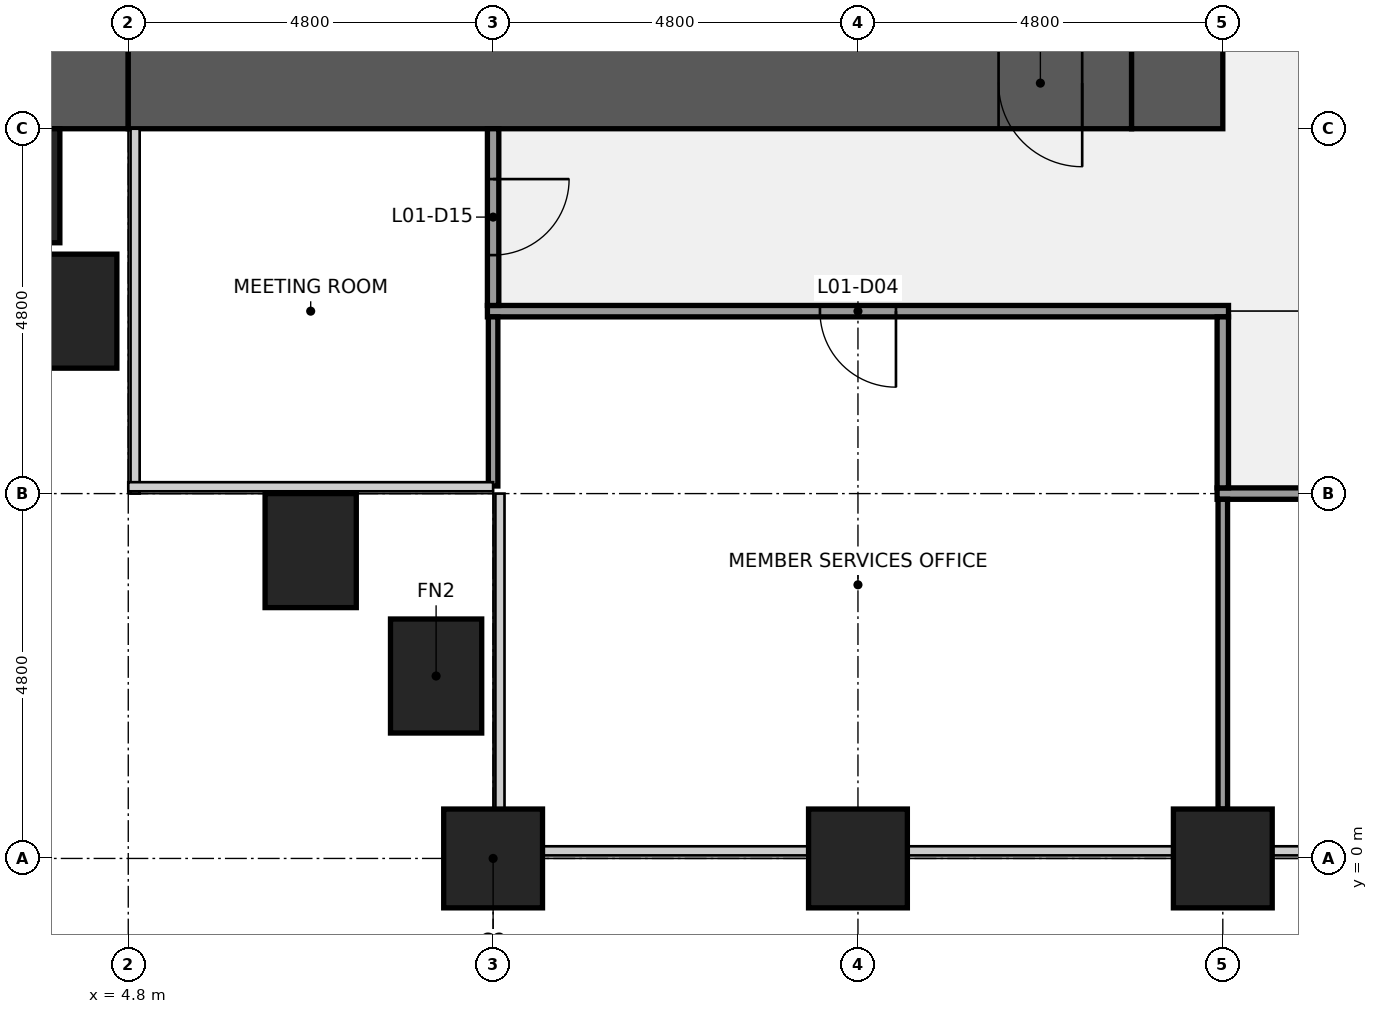
"""IFC4 building model, lengths in metres.
Left out: names, types, materials, properties, quantities, classifications, styles, units other than length and angle.
Written with IfcOpenShell. Run it as: python <this file> out.ifc"""

import sys

from ifc_helpers import new_model, si_unit, direction, frame, frame_2d, origin, origin_2d, place, context, subcontext, project, spatial, rectangle, extrude, element, fill, save


model = new_model("IFC4")
c1 = context("Model", 3, precision=1e-05, world=origin(), true_north=direction((0.0, 1.0)))
c2 = subcontext(c1, "Body", "Model", "MODEL_VIEW")
j1 = project(units=[si_unit("LENGTHUNIT", "METRE"), si_unit("PLANEANGLEUNIT", "RADIAN")], contexts=[c1])
p1 = place(None, origin())
s1 = spatial("IfcSite", under=j1, at=p1, CompositionType="ELEMENT")
p2 = place(p1, origin())
s2 = spatial("IfcBuilding", under=s1, at=p2, CompositionType="ELEMENT")
p3 = place(p2, frame((0.0, 0.0, 12.6)))
s3 = spatial("IfcBuildingStorey", under=s2, at=p3, CompositionType="ELEMENT", Elevation=12.6)
for number, where, z_axis, x_axis in (
    (1, (9.6, 0.0, 0.0), (0.0, 0.0, 1.0), (1.0, 0.0, 0.0)),
    (2, (14.4, 0.0, 0.0), (0.0, 0.0, 1.0), (1.0, 0.0, 0.0)),
    (3, (19.2, 0.0, 0.0), (0.0, 0.0, 1.0), (1.0, 0.0, 0.0)),
):
    element("IfcColumn", number, at=place(p3, frame(where, z_axis=z_axis, x_axis=x_axis)), inside=s3, PredefinedType="COLUMN", context=c2, shape_type="SweptSolid", body=[
        extrude(rectangle(XDim=1.3, YDim=1.3, at=origin_2d()), origin(), (0.0, 0.0, 1.0), 4.4),
    ])
p4 = place(p3, frame((4.8, 10.2, 0.0), z_axis=(0.0, 0.0, 1.0), x_axis=(-1.0, 0.0, 0.0)))
e4 = element("IfcWall", 4, at=p4, inside=s3, PredefinedType="SHEAR", context=c2, shape_type="SweptSolid", body=[
    extrude(rectangle(XDim=3.6, YDim=1.2, at=frame_2d((1.8, 0.0))), origin(), (0.0, 0.0, 1.0), 4.24),
])
p5 = place(p3, frame((18.0, 10.2, 0.0), z_axis=(0.0, 0.0, 1.0), x_axis=(-1.0, 0.0, 0.0)))
e5 = element("IfcWall", 5, at=p5, inside=s3, PredefinedType="SHEAR", context=c2, shape_type="SweptSolid", body=[
    extrude(rectangle(XDim=13.2, YDim=1.2, at=frame_2d((6.6, 0.0))), origin(), (0.0, 0.0, 1.0), 4.24),
])
p6 = place(p5, frame((0.65, 0.0, 0.0)))
e6 = element("IfcOpeningElement", 6, at=p6, cuts=e5, PredefinedType="OPENING", context=c2, shape_type="SweptSolid", body=[
    extrude(rectangle(XDim=1.1, YDim=2.1, at=frame_2d((0.55, 1.05))), frame((0.0, 0.61, 0.0), z_axis=(0.0, -1.0, 0.0), x_axis=(1.0, 0.0, 0.0)), (0.0, 0.0, 1.0), 1.22),
])
p7 = place(p3, frame((18.6, 38.4, 0.0), z_axis=(0.0, 0.0, 1.0), x_axis=(0.0, -1.0, 0.0)))
e7 = element("IfcWall", 7, at=p7, inside=s3, PredefinedType="SHEAR", context=c2, shape_type="SweptSolid", body=[
    extrude(rectangle(XDim=28.8, YDim=1.2, at=frame_2d((14.4, 0.0))), origin(), (0.0, 0.0, 1.0), 4.24),
])
p8 = place(p7, frame((18.3, 0.0, 0.0)))
e8 = element("IfcOpeningElement", 8, at=p8, cuts=e7, PredefinedType="OPENING", context=c2, shape_type="SweptSolid", body=[
    extrude(rectangle(XDim=1.8, YDim=2.1, at=frame_2d((0.9, 1.05))), frame((0.0, 0.61, 0.0), z_axis=(0.0, -1.0, 0.0), x_axis=(1.0, 0.0, 0.0)), (0.0, 0.0, 1.0), 1.22),
])
p9 = place(p7, frame((8.7, 0.0, 0.0)))
e9 = element("IfcOpeningElement", 9, at=p9, cuts=e7, PredefinedType="OPENING", context=c2, shape_type="SweptSolid", body=[
    extrude(rectangle(XDim=1.8, YDim=2.1, at=frame_2d((0.9, 1.05))), frame((0.0, 0.61, 0.0), z_axis=(0.0, -1.0, 0.0), x_axis=(1.0, 0.0, 0.0)), (0.0, 0.0, 1.0), 1.22),
])
p10 = place(p3, frame((19.125, 4.8, 0.0), z_axis=(0.0, 0.0, 1.0), x_axis=(1.0, 0.0, 0.0)))
e10 = element("IfcWall", 10, at=p10, inside=s3, PredefinedType="PARTITIONING", context=c2, shape_type="SweptSolid", body=[
    extrude(rectangle(XDim=19.35, YDim=0.15, at=frame_2d((9.675, 0.0))), origin(), (0.0, 0.0, 1.0), 3.27),
])
p11 = place(p10, frame((4.375, 0.0, 0.0)))
e11 = element("IfcOpeningElement", 11, at=p11, cuts=e10, PredefinedType="OPENING", context=c2, shape_type="SweptSolid", body=[
    extrude(rectangle(XDim=1.0, YDim=2.1, at=frame_2d((0.5, 1.05))), frame((0.0, 0.085, 0.0), z_axis=(0.0, -1.0, 0.0), x_axis=(1.0, 0.0, 0.0)), (0.0, 0.0, 1.0), 0.17),
])
p12 = place(p10, frame((11.575, 0.0, 0.0)))
e12 = element("IfcOpeningElement", 12, at=p12, cuts=e10, PredefinedType="OPENING", context=c2, shape_type="SweptSolid", body=[
    extrude(rectangle(XDim=1.0, YDim=2.1, at=frame_2d((0.5, 1.05))), frame((0.0, 0.085, 0.0), z_axis=(0.0, -1.0, 0.0), x_axis=(1.0, 0.0, 0.0)), (0.0, 0.0, 1.0), 0.17),
])
p13 = place(p10, frame((16.375, 0.0, 0.0)))
e13 = element("IfcOpeningElement", 13, at=p13, cuts=e10, PredefinedType="OPENING", context=c2, shape_type="SweptSolid", body=[
    extrude(rectangle(XDim=1.0, YDim=2.1, at=frame_2d((0.5, 1.05))), frame((0.0, 0.085, 0.0), z_axis=(0.0, -1.0, 0.0), x_axis=(1.0, 0.0, 0.0)), (0.0, 0.0, 1.0), 0.17),
])
p14 = place(p3, frame((9.525, 7.2, 0.0), z_axis=(0.0, 0.0, 1.0), x_axis=(1.0, 0.0, 0.0)))
e14 = element("IfcWall", 14, at=p14, inside=s3, PredefinedType="PARTITIONING", context=c2, shape_type="SweptSolid", body=[
    extrude(rectangle(XDim=9.75, YDim=0.15, at=frame_2d((4.875, 0.0))), origin(), (0.0, 0.0, 1.0), 3.27),
])
p15 = place(p14, frame((4.375, 0.0, 0.0)))
e15 = element("IfcOpeningElement", 15, at=p15, cuts=e14, PredefinedType="OPENING", context=c2, shape_type="SweptSolid", body=[
    extrude(rectangle(XDim=1.0, YDim=2.1, at=frame_2d((0.5, 1.05))), frame((0.0, 0.085, 0.0), z_axis=(0.0, -1.0, 0.0), x_axis=(1.0, 0.0, 0.0)), (0.0, 0.0, 1.0), 0.17),
])
p16 = place(p3, frame((9.6, 4.9, 0.0), z_axis=(0.0, 0.0, 1.0), x_axis=(0.0, 1.0, 0.0)))
e16 = element("IfcWall", 16, at=p16, inside=s3, PredefinedType="PARTITIONING", context=c2, shape_type="SweptSolid", body=[
    extrude(rectangle(XDim=2.225, YDim=0.125, at=frame_2d((1.113, 0.0))), origin(), (0.0, 0.0, 1.0), 3.27),
])
p17 = place(p3, frame((9.6, 7.275, 0.0), z_axis=(0.0, 0.0, 1.0), x_axis=(0.0, 1.0, 0.0)))
e17 = element("IfcWall", 17, at=p17, inside=s3, PredefinedType="PARTITIONING", context=c2, shape_type="SweptSolid", body=[
    extrude(rectangle(XDim=2.325, YDim=0.15, at=frame_2d((1.163, 0.0))), origin(), (0.0, 0.0, 1.0), 3.27),
])
p18 = place(p17, frame((0.663, 0.0, 0.0)))
e18 = element("IfcOpeningElement", 18, at=p18, cuts=e17, PredefinedType="OPENING", context=c2, shape_type="SweptSolid", body=[
    extrude(rectangle(XDim=1.0, YDim=2.1, at=frame_2d((0.5, 1.05))), frame((0.0, 0.085, 0.0), z_axis=(0.0, -1.0, 0.0), x_axis=(1.0, 0.0, 0.0)), (0.0, 0.0, 1.0), 0.17),
])
p19 = place(p3, frame((19.2, 0.65, 0.0), z_axis=(0.0, 0.0, 1.0), x_axis=(0.0, 1.0, 0.0)))
e19 = element("IfcWall", 19, at=p19, inside=s3, PredefinedType="PARTITIONING", context=c2, shape_type="SweptSolid", body=[
    extrude(rectangle(XDim=4.075, YDim=0.125, at=frame_2d((2.038, 0.0))), origin(), (0.0, 0.0, 1.0), 3.27),
])
p20 = place(p3, frame((19.2, 4.875, 0.0), z_axis=(0.0, 0.0, 1.0), x_axis=(0.0, 1.0, 0.0)))
e20 = element("IfcWall", 20, at=p20, inside=s3, PredefinedType="PARTITIONING", context=c2, shape_type="SweptSolid", body=[
    extrude(rectangle(XDim=2.25, YDim=0.15, at=frame_2d((1.125, 0.0))), origin(), (0.0, 0.0, 1.0), 3.27),
])
for number, where, z_axis, x_axis in (
    (21, (4.05, 7.2, 0.0), (0.0, 0.0, 1.0), (0.0, 1.0, 0.0)),
    (22, (7.2, 4.05, 0.0), (0.0, 0.0, 1.0), (1.0, 0.0, 0.0)),
    (23, (8.85, 2.4, 0.0), (0.0, 0.0, 1.0), (0.0, 1.0, 0.0)),
):
    element("IfcColumn", number, at=place(p3, frame(where, z_axis=z_axis, x_axis=x_axis)), inside=s3, PredefinedType="PILASTER", context=c2, shape_type="SweptSolid", body=[
        extrude(rectangle(XDim=1.2, YDim=1.5, at=origin_2d()), origin(), (0.0, 0.0, 1.0), 4.4),
    ])
p21 = place(p3, frame((2.4, 8.85, 0.0), z_axis=(0.0, 0.0, 1.0), x_axis=(1.0, 0.0, 0.0)))
e24 = element("IfcColumn", 24, at=p21, inside=s3, PredefinedType="PILASTER", context=c2, shape_type="SweptSolid", body=[
    extrude(rectangle(XDim=3.0, YDim=1.5, at=origin_2d()), origin(), (0.0, 0.0, 1.0), 4.4),
])
for number, where, z_axis, x_axis in (
    (25, (9.6, -1.075, 0.0), (0.0, 0.0, 1.0), (1.0, 0.0, 0.0)),
    (26, (14.4, -1.075, 0.0), (0.0, 0.0, 1.0), (1.0, 0.0, 0.0)),
    (27, (19.2, -1.075, 0.0), (0.0, 0.0, 1.0), (1.0, 0.0, 0.0)),
):
    element("IfcColumn", number, at=place(p3, frame(where, z_axis=z_axis, x_axis=x_axis)), inside=s3, PredefinedType="PILASTER", context=c2, shape_type="SweptSolid", body=[
        extrude(rectangle(XDim=4.2, YDim=0.85, at=origin_2d()), origin(), (0.0, 0.0, 1.0), 4.4),
    ])
p22 = place(p6, origin())
e28 = element("IfcDoor", 28, at=p22, inside=s3, OperationType="SINGLE_SWING_LEFT", PredefinedType="DOOR", context=c2, shape_type="SweptSolid", body=[
    extrude(rectangle(XDim=1.1, YDim=2.1, at=frame_2d((0.55, 1.05))), frame((0.0, 0.025, 0.0), z_axis=(0.0, -1.0, 0.0), x_axis=(1.0, 0.0, 0.0)), (0.0, 0.0, 1.0), 0.05),
])
fill(e6, e28)
p23 = place(p15, origin())
e29 = element("IfcDoor", 29, at=p23, inside=s3, OperationType="SINGLE_SWING_RIGHT", PredefinedType="DOOR", context=c2, shape_type="SweptSolid", body=[
    extrude(rectangle(XDim=1.0, YDim=2.1, at=frame_2d((0.5, 1.05))), frame((0.0, 0.025, 0.0), z_axis=(0.0, -1.0, 0.0), x_axis=(1.0, 0.0, 0.0)), (0.0, 0.0, 1.0), 0.05),
])
fill(e15, e29)
p24 = place(p18, origin())
e30 = element("IfcDoor", 30, at=p24, inside=s3, OperationType="SINGLE_SWING_RIGHT", PredefinedType="DOOR", context=c2, shape_type="SweptSolid", body=[
    extrude(rectangle(XDim=1.0, YDim=2.1, at=frame_2d((0.5, 1.05))), frame((0.0, 0.025, 0.0), z_axis=(0.0, -1.0, 0.0), x_axis=(1.0, 0.0, 0.0)), (0.0, 0.0, 1.0), 0.05),
])
fill(e18, e30)
save(model, sys.argv[1])
